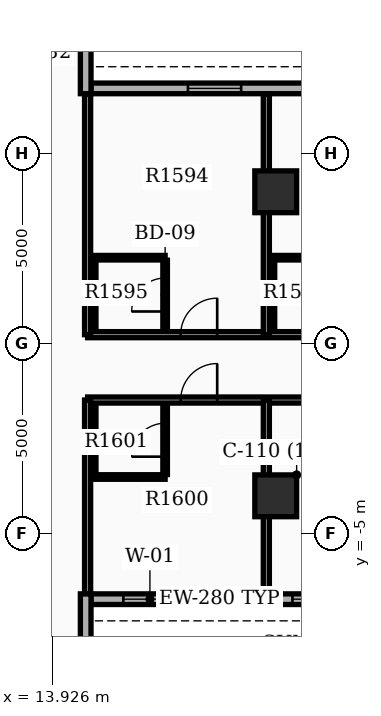
"""IFC4 building model, lengths in metres.
Left out: names, types, materials, properties, quantities, classifications, styles, units other than length and angle.
Written with IfcOpenShell. Run it as: python <this file> out.ifc"""

import sys

from ifc_helpers import new_model, si_unit, direction, frame, frame_2d, origin, origin_2d, place, context, subcontext, project, spatial, rectangle, extrude, element, fill, save


model = new_model("IFC4")
c1 = context("Model", 3, precision=1e-05, world=origin(), true_north=direction((0.0, 1.0)))
c2 = subcontext(c1, "Body", "Model", "MODEL_VIEW")
j1 = project(units=[si_unit("LENGTHUNIT", "METRE"), si_unit("PLANEANGLEUNIT", "RADIAN")], contexts=[c1])
p1 = place(None, origin())
s1 = spatial("IfcSite", under=j1, at=p1, CompositionType="ELEMENT")
p2 = place(p1, origin())
s2 = spatial("IfcBuilding", under=s1, at=p2, CompositionType="ELEMENT")
p3 = place(p2, frame((0.0, 0.0, 104.7)))
s3 = spatial("IfcBuildingStorey", under=s2, at=p3, CompositionType="ELEMENT", Elevation=104.7)
for number, where, z_axis, x_axis in (
    (1, (19.8, -4.0, 0.0), (0.0, 0.0, 1.0), (1.0, 0.0, 0.0)),
    (2, (19.8, 4.0, 0.0), (0.0, 0.0, 1.0), (1.0, 0.0, 0.0)),
):
    element("IfcColumn", number, at=place(p3, frame(where, z_axis=z_axis, x_axis=x_axis)), inside=s3, PredefinedType="COLUMN", context=c2, shape_type="SweptSolid", body=[
        extrude(rectangle(XDim=1.1, YDim=1.1, at=origin_2d()), origin(), (0.0, 0.0, 1.0), 3.9),
    ])
p4 = place(p3, frame((14.94, -6.72, 0.0), z_axis=(0.0, 0.0, 1.0), x_axis=(1.0, 0.0, 0.0)))
e3 = element("IfcWall", 3, at=p4, inside=s3, PredefinedType="STANDARD", context=c2, shape_type="SweptSolid", body=[
    extrude(rectangle(XDim=14.7, YDim=0.28, at=frame_2d((7.35, 0.0))), origin(), (0.0, 0.0, 1.0), 2.97),
])
p5 = place(p4, frame((0.85, 0.0, 0.8)))
e4 = element("IfcOpeningElement", 4, at=p5, cuts=e3, PredefinedType="OPENING", context=c2, shape_type="SweptSolid", body=[
    extrude(rectangle(XDim=1.4, YDim=1.6, at=frame_2d((0.7, 0.8))), frame((0.0, 0.15, 0.0), z_axis=(0.0, -1.0, 0.0), x_axis=(1.0, 0.0, 0.0)), (0.0, 0.0, 1.0), 0.3),
])
p6 = place(p4, frame((5.3, 0.0, 0.8)))
e5 = element("IfcOpeningElement", 5, at=p6, cuts=e3, PredefinedType="OPENING", context=c2, shape_type="SweptSolid", body=[
    extrude(rectangle(XDim=1.4, YDim=1.6, at=frame_2d((0.7, 0.8))), frame((0.0, 0.15, 0.0), z_axis=(0.0, -1.0, 0.0), x_axis=(1.0, 0.0, 0.0)), (0.0, 0.0, 1.0), 0.3),
])
p7 = place(p4, frame((10.5, 0.0, 0.8)))
e6 = element("IfcOpeningElement", 6, at=p7, cuts=e3, PredefinedType="OPENING", context=c2, shape_type="SweptSolid", body=[
    extrude(rectangle(XDim=1.4, YDim=1.6, at=frame_2d((0.7, 0.8))), frame((0.0, 0.15, 0.0), z_axis=(0.0, -1.0, 0.0), x_axis=(1.0, 0.0, 0.0)), (0.0, 0.0, 1.0), 0.3),
])
p8 = place(p3, frame((29.64, 6.72, 0.0), z_axis=(0.0, 0.0, 1.0), x_axis=(-1.0, 0.0, 0.0)))
e7 = element("IfcWall", 7, at=p8, inside=s3, PredefinedType="STANDARD", context=c2, shape_type="SweptSolid", body=[
    extrude(rectangle(XDim=14.7, YDim=0.28, at=frame_2d((7.35, 0.0))), origin(), (0.0, 0.0, 1.0), 2.97),
])
p9 = place(p8, frame((0.85, 0.0, 0.8)))
e8 = element("IfcOpeningElement", 8, at=p9, cuts=e7, PredefinedType="OPENING", context=c2, shape_type="SweptSolid", body=[
    extrude(rectangle(XDim=1.4, YDim=1.6, at=frame_2d((0.7, 0.8))), frame((0.0, 0.15, 0.0), z_axis=(0.0, -1.0, 0.0), x_axis=(1.0, 0.0, 0.0)), (0.0, 0.0, 1.0), 0.3),
])
p10 = place(p8, frame((5.55, 0.0, 0.8)))
e9 = element("IfcOpeningElement", 9, at=p10, cuts=e7, PredefinedType="OPENING", context=c2, shape_type="SweptSolid", body=[
    extrude(rectangle(XDim=1.4, YDim=1.6, at=frame_2d((0.7, 0.8))), frame((0.0, 0.15, 0.0), z_axis=(0.0, -1.0, 0.0), x_axis=(1.0, 0.0, 0.0)), (0.0, 0.0, 1.0), 0.3),
])
p11 = place(p8, frame((10.75, 0.0, 0.8)))
e10 = element("IfcOpeningElement", 10, at=p11, cuts=e7, PredefinedType="OPENING", context=c2, shape_type="SweptSolid", body=[
    extrude(rectangle(XDim=1.4, YDim=1.6, at=frame_2d((0.7, 0.8))), frame((0.0, 0.15, 0.0), z_axis=(0.0, -1.0, 0.0), x_axis=(1.0, 0.0, 0.0)), (0.0, 0.0, 1.0), 0.3),
])
for number, where, z_axis, x_axis in (
    (11, (14.8, 6.58, 0.0), (0.0, 0.0, 1.0), (0.0, 1.0, 0.0)),
    (12, (14.8, -6.58, 0.0), (0.0, 0.0, 1.0), (0.0, -1.0, 0.0)),
):
    element("IfcWall", number, at=place(p3, frame(where, z_axis=z_axis, x_axis=x_axis)), inside=s3, PredefinedType="STANDARD", context=c2, shape_type="SweptSolid", body=[
        extrude(rectangle(XDim=6.86, YDim=0.28, at=frame_2d((3.43, 0.0))), origin(), (0.0, 0.0, 1.0), 2.97),
    ])
p12 = place(p3, frame((14.85, 0.24, 0.0), z_axis=(0.0, 0.0, 1.0), x_axis=(1.0, 0.0, 0.0)))
e13 = element("IfcWall", 13, at=p12, inside=s3, PredefinedType="PARTITIONING", context=c2, shape_type="SweptSolid", body=[
    extrude(rectangle(XDim=14.782, YDim=0.16, at=frame_2d((7.391, 0.0))), origin(), (0.0, 0.0, 1.0), 2.96),
])
p13 = place(p12, frame((2.45, 0.0, 0.0)))
e14 = element("IfcOpeningElement", 14, at=p13, cuts=e13, PredefinedType="OPENING", context=c2, shape_type="SweptSolid", body=[
    extrude(rectangle(XDim=0.96, YDim=2.15, at=frame_2d((0.48, 1.075))), frame((0.0, 0.09, 0.0), z_axis=(0.0, -1.0, 0.0), x_axis=(1.0, 0.0, 0.0)), (0.0, 0.0, 1.0), 0.18),
])
p14 = place(p12, frame((8.654, 0.0, 0.0)))
e15 = element("IfcOpeningElement", 15, at=p14, cuts=e13, PredefinedType="OPENING", context=c2, shape_type="SweptSolid", body=[
    extrude(rectangle(XDim=0.96, YDim=2.15, at=frame_2d((0.48, 1.075))), frame((0.0, 0.09, 0.0), z_axis=(0.0, -1.0, 0.0), x_axis=(1.0, 0.0, 0.0)), (0.0, 0.0, 1.0), 0.18),
])
p15 = place(p12, frame((13.53, 0.0, 0.0)))
e16 = element("IfcOpeningElement", 16, at=p15, cuts=e13, PredefinedType="OPENING", context=c2, shape_type="SweptSolid", body=[
    extrude(rectangle(XDim=0.96, YDim=2.15, at=frame_2d((0.48, 1.075))), frame((0.0, 0.09, 0.0), z_axis=(0.0, -1.0, 0.0), x_axis=(1.0, 0.0, 0.0)), (0.0, 0.0, 1.0), 0.18),
])
for number, where, z_axis, x_axis in (
    (17, (14.85, 0.24, 0.0), (0.0, 0.0, 1.0), (0.0, 1.0, 0.0)),
    (18, (19.553, 0.24, 0.0), (0.0, 0.0, 1.0), (0.0, 1.0, 0.0)),
):
    element("IfcWall", number, at=place(p3, frame(where, z_axis=z_axis, x_axis=x_axis)), inside=s3, PredefinedType="PARTITIONING", context=c2, shape_type="SweptSolid", body=[
        extrude(rectangle(XDim=6.332, YDim=0.16, at=frame_2d((3.166, 0.0))), origin(), (0.0, 0.0, 1.0), 2.96),
    ])
p16 = place(p3, frame((16.89, 0.38, 0.0), z_axis=(0.0, 0.0, 1.0), x_axis=(0.0, 1.0, 0.0)))
e19 = element("IfcWall", 19, at=p16, inside=s3, PredefinedType="PARTITIONING", context=c2, shape_type="SweptSolid", body=[
    extrude(rectangle(XDim=1.82, YDim=0.12, at=frame_2d((0.91, 0.0))), origin(), (0.0, 0.0, 1.0), 2.96),
])
p17 = place(p16, frame((0.47, 0.0, 0.0)))
e20 = element("IfcOpeningElement", 20, at=p17, cuts=e19, PredefinedType="OPENING", context=c2, shape_type="SweptSolid", body=[
    extrude(rectangle(XDim=0.88, YDim=2.1, at=frame_2d((0.44, 1.05))), frame((0.0, 0.07, 0.0), z_axis=(0.0, -1.0, 0.0), x_axis=(1.0, 0.0, 0.0)), (0.0, 0.0, 1.0), 0.14),
])
p18 = place(p3, frame((15.01, 0.38, 0.0), z_axis=(0.0, 0.0, 1.0), x_axis=(0.0, 1.0, 0.0)))
e21 = element("IfcWall", 21, at=p18, inside=s3, PredefinedType="PARTITIONING", context=c2, shape_type="SweptSolid", body=[
    extrude(rectangle(XDim=1.82, YDim=0.12, at=frame_2d((0.91, 0.0))), origin(), (0.0, 0.0, 1.0), 2.96),
])
p19 = place(p3, frame((15.01, 2.265, 0.0), z_axis=(0.0, 0.0, 1.0), x_axis=(1.0, 0.0, 0.0)))
e22 = element("IfcWall", 22, at=p19, inside=s3, PredefinedType="PARTITIONING", context=c2, shape_type="SweptSolid", body=[
    extrude(rectangle(XDim=1.88, YDim=0.12, at=frame_2d((0.94, 0.0))), origin(), (0.0, 0.0, 1.0), 2.96),
])
p20 = place(p3, frame((19.713, 0.38, 0.0), z_axis=(0.0, 0.0, 1.0), x_axis=(0.0, 1.0, 0.0)))
e23 = element("IfcWall", 23, at=p20, inside=s3, PredefinedType="PARTITIONING", context=c2, shape_type="SweptSolid", body=[
    extrude(rectangle(XDim=1.82, YDim=0.12, at=frame_2d((0.91, 0.0))), origin(), (0.0, 0.0, 1.0), 2.96),
])
p21 = place(p3, frame((19.713, 2.265, 0.0), z_axis=(0.0, 0.0, 1.0), x_axis=(1.0, 0.0, 0.0)))
e24 = element("IfcWall", 24, at=p21, inside=s3, PredefinedType="PARTITIONING", context=c2, shape_type="SweptSolid", body=[
    extrude(rectangle(XDim=1.88, YDim=0.12, at=frame_2d((0.94, 0.0))), origin(), (0.0, 0.0, 1.0), 2.96),
])
p22 = place(p3, frame((14.85, -1.48, 0.0), z_axis=(0.0, 0.0, 1.0), x_axis=(1.0, 0.0, 0.0)))
e25 = element("IfcWall", 25, at=p22, inside=s3, PredefinedType="PARTITIONING", context=c2, shape_type="SweptSolid", body=[
    extrude(rectangle(XDim=14.782, YDim=0.16, at=frame_2d((7.391, 0.0))), origin(), (0.0, 0.0, 1.0), 2.96),
])
p23 = place(p22, frame((2.45, 0.0, 0.0)))
e26 = element("IfcOpeningElement", 26, at=p23, cuts=e25, PredefinedType="OPENING", context=c2, shape_type="SweptSolid", body=[
    extrude(rectangle(XDim=0.96, YDim=2.15, at=frame_2d((0.48, 1.075))), frame((0.0, 0.09, 0.0), z_axis=(0.0, -1.0, 0.0), x_axis=(1.0, 0.0, 0.0)), (0.0, 0.0, 1.0), 0.18),
])
p24 = place(p22, frame((6.453, 0.0, 0.0)))
e27 = element("IfcOpeningElement", 27, at=p24, cuts=e25, PredefinedType="OPENING", context=c2, shape_type="SweptSolid", body=[
    extrude(rectangle(XDim=0.96, YDim=2.15, at=frame_2d((0.48, 1.075))), frame((0.0, 0.09, 0.0), z_axis=(0.0, -1.0, 0.0), x_axis=(1.0, 0.0, 0.0)), (0.0, 0.0, 1.0), 0.18),
])
p25 = place(p22, frame((13.53, 0.0, 0.0)))
e28 = element("IfcOpeningElement", 28, at=p25, cuts=e25, PredefinedType="OPENING", context=c2, shape_type="SweptSolid", body=[
    extrude(rectangle(XDim=0.96, YDim=2.15, at=frame_2d((0.48, 1.075))), frame((0.0, 0.09, 0.0), z_axis=(0.0, -1.0, 0.0), x_axis=(1.0, 0.0, 0.0)), (0.0, 0.0, 1.0), 0.18),
])
for number, where, z_axis, x_axis in (
    (29, (14.85, -1.48, 0.0), (0.0, 0.0, 1.0), (0.0, -1.0, 0.0)),
    (30, (19.553, -1.48, 0.0), (0.0, 0.0, 1.0), (0.0, -1.0, 0.0)),
):
    element("IfcWall", number, at=place(p3, frame(where, z_axis=z_axis, x_axis=x_axis)), inside=s3, PredefinedType="PARTITIONING", context=c2, shape_type="SweptSolid", body=[
        extrude(rectangle(XDim=5.092, YDim=0.16, at=frame_2d((2.546, 0.0))), origin(), (0.0, 0.0, 1.0), 2.96),
    ])
p26 = place(p3, frame((16.89, -3.44, 0.0), z_axis=(0.0, 0.0, 1.0), x_axis=(0.0, 1.0, 0.0)))
e31 = element("IfcWall", 31, at=p26, inside=s3, PredefinedType="PARTITIONING", context=c2, shape_type="SweptSolid", body=[
    extrude(rectangle(XDim=1.82, YDim=0.12, at=frame_2d((0.91, 0.0))), origin(), (0.0, 0.0, 1.0), 2.96),
])
p27 = place(p26, frame((0.47, 0.0, 0.0)))
e32 = element("IfcOpeningElement", 32, at=p27, cuts=e31, PredefinedType="OPENING", context=c2, shape_type="SweptSolid", body=[
    extrude(rectangle(XDim=0.88, YDim=2.1, at=frame_2d((0.44, 1.05))), frame((0.0, 0.07, 0.0), z_axis=(0.0, -1.0, 0.0), x_axis=(1.0, 0.0, 0.0)), (0.0, 0.0, 1.0), 0.14),
])
p28 = place(p3, frame((15.01, -3.44, 0.0), z_axis=(0.0, 0.0, 1.0), x_axis=(0.0, 1.0, 0.0)))
e33 = element("IfcWall", 33, at=p28, inside=s3, PredefinedType="PARTITIONING", context=c2, shape_type="SweptSolid", body=[
    extrude(rectangle(XDim=1.82, YDim=0.12, at=frame_2d((0.91, 0.0))), origin(), (0.0, 0.0, 1.0), 2.96),
])
p29 = place(p3, frame((15.01, -3.505, 0.0), z_axis=(0.0, 0.0, 1.0), x_axis=(1.0, 0.0, 0.0)))
e34 = element("IfcWall", 34, at=p29, inside=s3, PredefinedType="PARTITIONING", context=c2, shape_type="SweptSolid", body=[
    extrude(rectangle(XDim=1.88, YDim=0.12, at=frame_2d((0.94, 0.0))), origin(), (0.0, 0.0, 1.0), 2.96),
])
p30 = place(p5, origin())
e35 = element("IfcWindow", 35, at=p30, inside=s3, PartitioningType="SINGLE_PANEL", PredefinedType="WINDOW", context=c2, shape_type="SweptSolid", body=[
    extrude(rectangle(XDim=1.4, YDim=1.6, at=frame_2d((0.7, 0.8))), frame((0.0, 0.03, 0.0), z_axis=(0.0, -1.0, 0.0), x_axis=(1.0, 0.0, 0.0)), (0.0, 0.0, 1.0), 0.06),
])
fill(e4, e35)
p31 = place(p6, origin())
e36 = element("IfcWindow", 36, at=p31, inside=s3, PartitioningType="SINGLE_PANEL", PredefinedType="WINDOW", context=c2, shape_type="SweptSolid", body=[
    extrude(rectangle(XDim=1.4, YDim=1.6, at=frame_2d((0.7, 0.8))), frame((0.0, 0.03, 0.0), z_axis=(0.0, -1.0, 0.0), x_axis=(1.0, 0.0, 0.0)), (0.0, 0.0, 1.0), 0.06),
])
fill(e5, e36)
p32 = place(p11, origin())
e37 = element("IfcWindow", 37, at=p32, inside=s3, PartitioningType="SINGLE_PANEL", PredefinedType="WINDOW", context=c2, shape_type="SweptSolid", body=[
    extrude(rectangle(XDim=1.4, YDim=1.6, at=frame_2d((0.7, 0.8))), frame((0.0, 0.03, 0.0), z_axis=(0.0, -1.0, 0.0), x_axis=(1.0, 0.0, 0.0)), (0.0, 0.0, 1.0), 0.06),
])
fill(e10, e37)
p33 = place(p13, origin())
e38 = element("IfcDoor", 38, at=p33, inside=s3, OperationType="SINGLE_SWING_RIGHT", PredefinedType="DOOR", context=c2, shape_type="SweptSolid", body=[
    extrude(rectangle(XDim=0.96, YDim=2.15, at=frame_2d((0.48, 1.075))), frame((0.0, 0.025, 0.0), z_axis=(0.0, -1.0, 0.0), x_axis=(1.0, 0.0, 0.0)), (0.0, 0.0, 1.0), 0.05),
])
fill(e14, e38)
p34 = place(p17, origin())
e39 = element("IfcDoor", 39, at=p34, inside=s3, OperationType="SINGLE_SWING_LEFT", PredefinedType="DOOR", context=c2, shape_type="SweptSolid", body=[
    extrude(rectangle(XDim=0.88, YDim=2.1, at=frame_2d((0.44, 1.05))), frame((0.0, 0.025, 0.0), z_axis=(0.0, -1.0, 0.0), x_axis=(1.0, 0.0, 0.0)), (0.0, 0.0, 1.0), 0.05),
])
fill(e20, e39)
p35 = place(p23, origin())
e40 = element("IfcDoor", 40, at=p35, inside=s3, OperationType="SINGLE_SWING_RIGHT", PredefinedType="DOOR", context=c2, shape_type="SweptSolid", body=[
    extrude(rectangle(XDim=0.96, YDim=2.15, at=frame_2d((0.48, 1.075))), frame((0.0, 0.025, 0.0), z_axis=(0.0, -1.0, 0.0), x_axis=(1.0, 0.0, 0.0)), (0.0, 0.0, 1.0), 0.05),
])
fill(e26, e40)
p36 = place(p27, origin())
e41 = element("IfcDoor", 41, at=p36, inside=s3, OperationType="SINGLE_SWING_LEFT", PredefinedType="DOOR", context=c2, shape_type="SweptSolid", body=[
    extrude(rectangle(XDim=0.88, YDim=2.1, at=frame_2d((0.44, 1.05))), frame((0.0, 0.025, 0.0), z_axis=(0.0, -1.0, 0.0), x_axis=(1.0, 0.0, 0.0)), (0.0, 0.0, 1.0), 0.05),
])
fill(e32, e41)
save(model, sys.argv[1])
